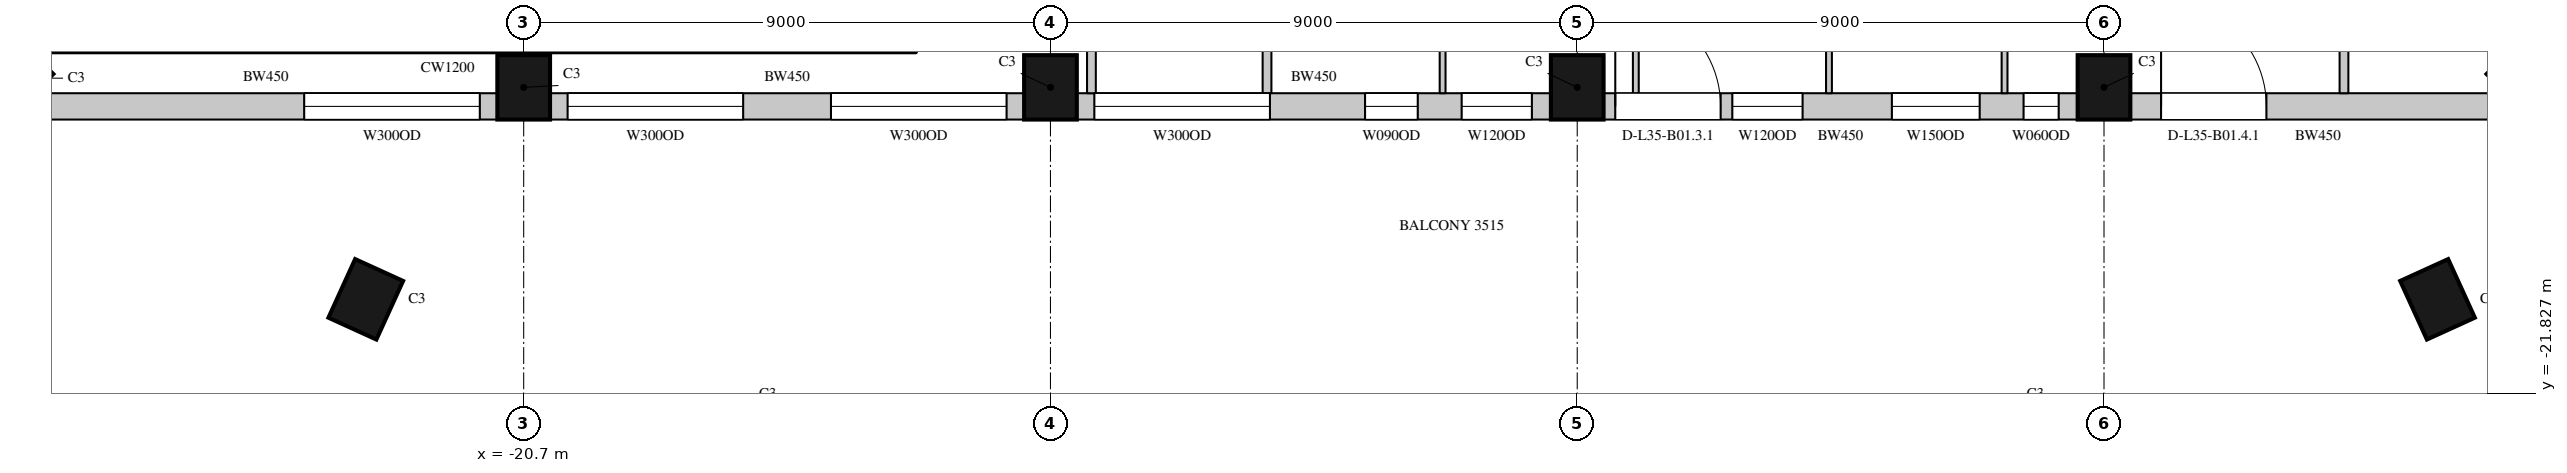
"""IFC4 building model, lengths in metres.
Left out: names, types, materials, properties, quantities, classifications, styles, units other than length and angle.
Written with IfcOpenShell. Run it as: python <this file> out.ifc"""

import sys

from ifc_helpers import new_model, si_unit, direction, frame, frame_2d, origin, origin_2d, place, context, subcontext, project, spatial, rectangle, extrude, element, fill, save


model = new_model("IFC4")
c1 = context("Model", 3, precision=1e-05, world=origin(), true_north=direction((0.0, 1.0)))
c2 = subcontext(c1, "Body", "Model", "MODEL_VIEW")
j1 = project(units=[si_unit("LENGTHUNIT", "METRE"), si_unit("PLANEANGLEUNIT", "RADIAN")], contexts=[c1])
p1 = place(None, origin())
s1 = spatial("IfcSite", under=j1, at=p1, CompositionType="ELEMENT")
p2 = place(p1, origin())
s2 = spatial("IfcBuilding", under=s1, at=p2, CompositionType="ELEMENT")
p3 = place(p2, frame((0.0, 0.0, 164.6)))
s3 = spatial("IfcBuildingStorey", under=s2, at=p3, CompositionType="ELEMENT", Elevation=164.6)
for number, where, z_axis, x_axis in (
    (1, (-29.443, -16.443, 0.0), (0.0, 0.0, 1.0), (0.707, -0.707, 0.0)),
    (2, (-20.7, -16.6, 0.0), (0.0, 0.0, 1.0), (1.0, 0.0, 0.0)),
    (3, (-11.7, -16.6, 0.0), (0.0, 0.0, 1.0), (1.0, 0.0, 0.0)),
    (4, (-2.7, -16.6, 0.0), (0.0, 0.0, 1.0), (1.0, 0.0, 0.0)),
    (5, (6.3, -16.6, 0.0), (0.0, 0.0, 1.0), (1.0, 0.0, 0.0)),
    (6, (13.543, -16.443, 0.0), (0.0, 0.0, 1.0), (0.707, 0.707, 0.0)),
    (7, (-23.398, -20.221, 0.0), (0.0, 0.0, 1.0), (0.91, -0.415, 0.0)),
    (8, (11.998, -20.221, 0.0), (0.0, 0.0, 1.0), (0.91, 0.415, 0.0)),
):
    element("IfcColumn", number, at=place(p3, frame(where, z_axis=z_axis, x_axis=x_axis)), inside=s3, PredefinedType="COLUMN", context=c2, shape_type="SweptSolid", body=[
        extrude(rectangle(XDim=0.9, YDim=1.1, at=origin_2d()), origin(), (0.0, 0.0, 1.0), 4.1),
    ])
p4 = place(p3, frame((-29.064, -16.925, 0.0), z_axis=(0.0, 0.0, 1.0), x_axis=(1.0, 0.0, 0.0)))
e9 = element("IfcWall", 9, at=p4, inside=s3, PredefinedType="SOLIDWALL", context=c2, shape_type="SweptSolid", body=[
    extrude(rectangle(XDim=7.914, YDim=0.45, at=frame_2d((3.957, 0.0))), origin(), (0.0, 0.0, 1.0), 3.8),
])
p5 = place(p4, frame((4.614, 0.0, 1.05)))
e10 = element("IfcOpeningElement", 10, at=p5, cuts=e9, PredefinedType="OPENING", context=c2, shape_type="SweptSolid", body=[
    extrude(rectangle(XDim=3.0, YDim=2.4, at=frame_2d((1.5, 1.2))), frame((0.0, 0.235, 0.0), z_axis=(0.0, -1.0, 0.0), x_axis=(1.0, 0.0, 0.0)), (0.0, 0.0, 1.0), 0.47),
])
p6 = place(p3, frame((-20.25, -16.925, 0.0), z_axis=(0.0, 0.0, 1.0), x_axis=(1.0, 0.0, 0.0)))
e11 = element("IfcWall", 11, at=p6, inside=s3, PredefinedType="SOLIDWALL", context=c2, shape_type="SweptSolid", body=[
    extrude(rectangle(XDim=8.1, YDim=0.45, at=frame_2d((4.05, 0.0))), origin(), (0.0, 0.0, 1.0), 3.8),
])
p7 = place(p6, frame((0.3, 0.0, 1.05)))
e12 = element("IfcOpeningElement", 12, at=p7, cuts=e11, PredefinedType="OPENING", context=c2, shape_type="SweptSolid", body=[
    extrude(rectangle(XDim=3.0, YDim=2.4, at=frame_2d((1.5, 1.2))), frame((0.0, 0.235, 0.0), z_axis=(0.0, -1.0, 0.0), x_axis=(1.0, 0.0, 0.0)), (0.0, 0.0, 1.0), 0.47),
])
p8 = place(p6, frame((4.8, 0.0, 1.05)))
e13 = element("IfcOpeningElement", 13, at=p8, cuts=e11, PredefinedType="OPENING", context=c2, shape_type="SweptSolid", body=[
    extrude(rectangle(XDim=3.0, YDim=2.4, at=frame_2d((1.5, 1.2))), frame((0.0, 0.235, 0.0), z_axis=(0.0, -1.0, 0.0), x_axis=(1.0, 0.0, 0.0)), (0.0, 0.0, 1.0), 0.47),
])
p9 = place(p3, frame((-11.25, -16.925, 0.0), z_axis=(0.0, 0.0, 1.0), x_axis=(1.0, 0.0, 0.0)))
e14 = element("IfcWall", 14, at=p9, inside=s3, PredefinedType="SOLIDWALL", context=c2, shape_type="SweptSolid", body=[
    extrude(rectangle(XDim=8.1, YDim=0.45, at=frame_2d((4.05, 0.0))), origin(), (0.0, 0.0, 1.0), 3.8),
])
p10 = place(p9, frame((0.3, 0.0, 1.05)))
e15 = element("IfcOpeningElement", 15, at=p10, cuts=e14, PredefinedType="OPENING", context=c2, shape_type="SweptSolid", body=[
    extrude(rectangle(XDim=3.0, YDim=2.4, at=frame_2d((1.5, 1.2))), frame((0.0, 0.235, 0.0), z_axis=(0.0, -1.0, 0.0), x_axis=(1.0, 0.0, 0.0)), (0.0, 0.0, 1.0), 0.47),
])
p11 = place(p9, frame((4.925, 0.0, 1.05)))
e16 = element("IfcOpeningElement", 16, at=p11, cuts=e14, PredefinedType="OPENING", context=c2, shape_type="SweptSolid", body=[
    extrude(rectangle(XDim=0.9, YDim=2.4, at=frame_2d((0.45, 1.2))), frame((0.0, 0.235, 0.0), z_axis=(0.0, -1.0, 0.0), x_axis=(1.0, 0.0, 0.0)), (0.0, 0.0, 1.0), 0.47),
])
p12 = place(p9, frame((6.575, 0.0, 1.05)))
e17 = element("IfcOpeningElement", 17, at=p12, cuts=e14, PredefinedType="OPENING", context=c2, shape_type="SweptSolid", body=[
    extrude(rectangle(XDim=1.2, YDim=2.4, at=frame_2d((0.6, 1.2))), frame((0.0, 0.235, 0.0), z_axis=(0.0, -1.0, 0.0), x_axis=(1.0, 0.0, 0.0)), (0.0, 0.0, 1.0), 0.47),
])
p13 = place(p3, frame((-2.25, -16.925, 0.0), z_axis=(0.0, 0.0, 1.0), x_axis=(1.0, 0.0, 0.0)))
e18 = element("IfcWall", 18, at=p13, inside=s3, PredefinedType="SOLIDWALL", context=c2, shape_type="SweptSolid", body=[
    extrude(rectangle(XDim=8.1, YDim=0.45, at=frame_2d((4.05, 0.0))), origin(), (0.0, 0.0, 1.0), 3.8),
])
p14 = place(p13, frame((0.2, 0.0, 0.0)))
e19 = element("IfcOpeningElement", 19, at=p14, cuts=e18, PredefinedType="OPENING", context=c2, shape_type="SweptSolid", body=[
    extrude(rectangle(XDim=1.8, YDim=2.4, at=frame_2d((0.9, 1.2))), frame((0.0, 0.235, 0.0), z_axis=(0.0, -1.0, 0.0), x_axis=(1.0, 0.0, 0.0)), (0.0, 0.0, 1.0), 0.47),
])
p15 = place(p13, frame((2.2, 0.0, 1.05)))
e20 = element("IfcOpeningElement", 20, at=p15, cuts=e18, PredefinedType="OPENING", context=c2, shape_type="SweptSolid", body=[
    extrude(rectangle(XDim=1.2, YDim=2.4, at=frame_2d((0.6, 1.2))), frame((0.0, 0.235, 0.0), z_axis=(0.0, -1.0, 0.0), x_axis=(1.0, 0.0, 0.0)), (0.0, 0.0, 1.0), 0.47),
])
p16 = place(p13, frame((4.926, 0.0, 1.05)))
e21 = element("IfcOpeningElement", 21, at=p16, cuts=e18, PredefinedType="OPENING", context=c2, shape_type="SweptSolid", body=[
    extrude(rectangle(XDim=1.5, YDim=2.4, at=frame_2d((0.75, 1.2))), frame((0.0, 0.235, 0.0), z_axis=(0.0, -1.0, 0.0), x_axis=(1.0, 0.0, 0.0)), (0.0, 0.0, 1.0), 0.47),
])
p17 = place(p13, frame((7.176, 0.0, 1.05)))
e22 = element("IfcOpeningElement", 22, at=p17, cuts=e18, PredefinedType="OPENING", context=c2, shape_type="SweptSolid", body=[
    extrude(rectangle(XDim=0.6, YDim=2.4, at=frame_2d((0.3, 1.2))), frame((0.0, 0.235, 0.0), z_axis=(0.0, -1.0, 0.0), x_axis=(1.0, 0.0, 0.0)), (0.0, 0.0, 1.0), 0.47),
])
p18 = place(p3, frame((6.75, -16.925, 0.0), z_axis=(0.0, 0.0, 1.0), x_axis=(1.0, 0.0, 0.0)))
e23 = element("IfcWall", 23, at=p18, inside=s3, PredefinedType="SOLIDWALL", context=c2, shape_type="SweptSolid", body=[
    extrude(rectangle(XDim=6.414, YDim=0.45, at=frame_2d((3.207, 0.0))), origin(), (0.0, 0.0, 1.0), 3.8),
])
p19 = place(p18, frame((0.525, 0.0, 0.0)))
e24 = element("IfcOpeningElement", 24, at=p19, cuts=e23, PredefinedType="OPENING", context=c2, shape_type="SweptSolid", body=[
    extrude(rectangle(XDim=1.8, YDim=2.4, at=frame_2d((0.9, 1.2))), frame((0.0, 0.235, 0.0), z_axis=(0.0, -1.0, 0.0), x_axis=(1.0, 0.0, 0.0)), (0.0, 0.0, 1.0), 0.47),
])
p20 = place(p3, frame((-26.95, -18.0, 0.0), z_axis=(0.0, 0.0, 1.0), x_axis=(1.0, 0.0, 0.0)))
e25 = element("IfcWall", 25, at=p20, inside=s3, PredefinedType="SOLIDWALL", context=c2, shape_type="SweptSolid", body=[
    extrude(rectangle(XDim=2.36, YDim=0.45, at=frame_2d((1.18, 0.0))), origin(), (0.0, 0.0, 1.0), 0.6),
])
for number, where, z_axis, x_axis in (
    (26, (-23.69, -18.0, 0.0), (0.0, 0.0, 1.0), (1.0, 0.0, 0.0)),
    (27, (-19.73, -18.0, 0.0), (0.0, 0.0, 1.0), (1.0, 0.0, 0.0)),
    (28, (-15.77, -18.0, 0.0), (0.0, 0.0, 1.0), (1.0, 0.0, 0.0)),
    (29, (-11.81, -18.0, 0.0), (0.0, 0.0, 1.0), (1.0, 0.0, 0.0)),
    (30, (-7.85, -18.0, 0.0), (0.0, 0.0, 1.0), (1.0, 0.0, 0.0)),
):
    element("IfcWall", number, at=place(p3, frame(where, z_axis=z_axis, x_axis=x_axis)), inside=s3, PredefinedType="SOLIDWALL", context=c2, shape_type="SweptSolid", body=[
        extrude(rectangle(XDim=3.76, YDim=0.45, at=frame_2d((1.88, 0.0))), origin(), (0.0, 0.0, 1.0), 0.6),
    ])
p21 = place(p3, frame((-3.89, -18.0, 0.0), z_axis=(0.0, 0.0, 1.0), x_axis=(1.0, 0.0, 0.0)))
e31 = element("IfcWall", 31, at=p21, inside=s3, PredefinedType="SOLIDWALL", context=c2, shape_type="SweptSolid", body=[
    extrude(rectangle(XDim=1.54, YDim=0.45, at=frame_2d((0.77, 0.0))), origin(), (0.0, 0.0, 1.0), 0.6),
])
p22 = place(p3, frame((0.07, -18.0, 0.0), z_axis=(0.0, 0.0, 1.0), x_axis=(1.0, 0.0, 0.0)))
e32 = element("IfcWall", 32, at=p22, inside=s3, PredefinedType="SOLIDWALL", context=c2, shape_type="SweptSolid", body=[
    extrude(rectangle(XDim=3.76, YDim=0.45, at=frame_2d((1.88, 0.0))), origin(), (0.0, 0.0, 1.0), 0.6),
])
p23 = place(p3, frame((4.03, -18.0, 0.0), z_axis=(0.0, 0.0, 1.0), x_axis=(1.0, 0.0, 0.0)))
e33 = element("IfcWall", 33, at=p23, inside=s3, PredefinedType="SOLIDWALL", context=c2, shape_type="SweptSolid", body=[
    extrude(rectangle(XDim=2.945, YDim=0.45, at=frame_2d((1.473, 0.0))), origin(), (0.0, 0.0, 1.0), 0.6),
])
p24 = place(p3, frame((-11.0, -16.7, 0.0), z_axis=(0.0, 0.0, 1.0), x_axis=(0.0, 1.0, 0.0)))
e34 = element("IfcWall", 34, at=p24, inside=s3, PredefinedType="PARTITIONING", context=c2, shape_type="SweptSolid", body=[
    extrude(rectangle(XDim=1.88, YDim=0.15, at=frame_2d((0.94, 0.0))), origin(), (0.0, 0.0, 1.0), 3.8),
])
p25 = place(p3, frame((-8.0, -16.7, 0.0), z_axis=(0.0, 0.0, 1.0), x_axis=(0.0, 1.0, 0.0)))
e35 = element("IfcWall", 35, at=p25, inside=s3, PredefinedType="PARTITIONING", context=c2, shape_type="SweptSolid", body=[
    extrude(rectangle(XDim=5.2, YDim=0.15, at=frame_2d((2.6, 0.0))), origin(), (0.0, 0.0, 1.0), 3.8),
])
p26 = place(p3, frame((10.4, -16.7, 0.0), z_axis=(0.0, 0.0, 1.0), x_axis=(0.0, 1.0, 0.0)))
e36 = element("IfcWall", 36, at=p26, inside=s3, PredefinedType="PARTITIONING", context=c2, shape_type="SweptSolid", body=[
    extrude(rectangle(XDim=5.3, YDim=0.15, at=frame_2d((2.65, 0.0))), origin(), (0.0, 0.0, 1.0), 3.8),
])
for number, where, z_axis, x_axis in (
    (37, (-5.0, -16.7, 0.0), (0.0, 0.0, 1.0), (0.0, 1.0, 0.0)),
    (38, (-1.699, -16.7, 0.0), (0.0, 0.0, 1.0), (0.0, 1.0, 0.0)),
):
    element("IfcWall", number, at=place(p3, frame(where, z_axis=z_axis, x_axis=x_axis)), inside=s3, PredefinedType="PARTITIONING", context=c2, shape_type="SweptSolid", body=[
        extrude(rectangle(XDim=5.2, YDim=0.1, at=frame_2d((2.6, 0.0))), origin(), (0.0, 0.0, 1.0), 3.8),
    ])
p27 = place(p3, frame((1.601, -16.7, 0.0), z_axis=(0.0, 0.0, 1.0), x_axis=(0.0, 1.0, 0.0)))
e39 = element("IfcWall", 39, at=p27, inside=s3, PredefinedType="PARTITIONING", context=c2, shape_type="SweptSolid", body=[
    extrude(rectangle(XDim=5.2, YDim=0.1, at=frame_2d((2.6, 0.0))), origin(), (0.0, 0.0, 1.0), 3.15),
])
p28 = place(p3, frame((4.601, -16.7, 0.0), z_axis=(0.0, 0.0, 1.0), x_axis=(0.0, 1.0, 0.0)))
e40 = element("IfcWall", 40, at=p28, inside=s3, PredefinedType="PARTITIONING", context=c2, shape_type="SweptSolid", body=[
    extrude(rectangle(XDim=5.2, YDim=0.1, at=frame_2d((2.6, 0.0))), origin(), (0.0, 0.0, 1.0), 3.8),
])
p29 = place(p5, origin())
e41 = element("IfcWindow", 41, at=p29, inside=s3, PartitioningType="SINGLE_PANEL", PredefinedType="WINDOW", context=c2, shape_type="SweptSolid", body=[
    extrude(rectangle(XDim=3.0, YDim=2.4, at=frame_2d((1.5, 1.2))), frame((0.0, 0.135, 0.0), z_axis=(0.0, -1.0, 0.0), x_axis=(1.0, 0.0, 0.0)), (0.0, 0.0, 1.0), 0.06),
])
fill(e10, e41)
p30 = place(p7, origin())
e42 = element("IfcWindow", 42, at=p30, inside=s3, PartitioningType="SINGLE_PANEL", PredefinedType="WINDOW", context=c2, shape_type="SweptSolid", body=[
    extrude(rectangle(XDim=3.0, YDim=2.4, at=frame_2d((1.5, 1.2))), frame((0.0, 0.135, 0.0), z_axis=(0.0, -1.0, 0.0), x_axis=(1.0, 0.0, 0.0)), (0.0, 0.0, 1.0), 0.06),
])
fill(e12, e42)
p31 = place(p8, origin())
e43 = element("IfcWindow", 43, at=p31, inside=s3, PartitioningType="SINGLE_PANEL", PredefinedType="WINDOW", context=c2, shape_type="SweptSolid", body=[
    extrude(rectangle(XDim=3.0, YDim=2.4, at=frame_2d((1.5, 1.2))), frame((0.0, 0.135, 0.0), z_axis=(0.0, -1.0, 0.0), x_axis=(1.0, 0.0, 0.0)), (0.0, 0.0, 1.0), 0.06),
])
fill(e13, e43)
p32 = place(p10, origin())
e44 = element("IfcWindow", 44, at=p32, inside=s3, PartitioningType="SINGLE_PANEL", PredefinedType="WINDOW", context=c2, shape_type="SweptSolid", body=[
    extrude(rectangle(XDim=3.0, YDim=2.4, at=frame_2d((1.5, 1.2))), frame((0.0, 0.135, 0.0), z_axis=(0.0, -1.0, 0.0), x_axis=(1.0, 0.0, 0.0)), (0.0, 0.0, 1.0), 0.06),
])
fill(e15, e44)
p33 = place(p14, origin())
e45 = element("IfcDoor", 45, at=p33, inside=s3, OperationType="SLIDING_TO_LEFT", PredefinedType="DOOR", context=c2, shape_type="SweptSolid", body=[
    extrude(rectangle(XDim=1.8, YDim=2.4, at=frame_2d((0.9, 1.2))), frame((0.0, 0.13, 0.0), z_axis=(0.0, -1.0, 0.0), x_axis=(1.0, 0.0, 0.0)), (0.0, 0.0, 1.0), 0.05),
])
fill(e19, e45)
p34 = place(p15, origin())
e46 = element("IfcWindow", 46, at=p34, inside=s3, PartitioningType="SINGLE_PANEL", PredefinedType="WINDOW", context=c2, shape_type="SweptSolid", body=[
    extrude(rectangle(XDim=1.2, YDim=2.4, at=frame_2d((0.6, 1.2))), frame((0.0, 0.135, 0.0), z_axis=(0.0, -1.0, 0.0), x_axis=(1.0, 0.0, 0.0)), (0.0, 0.0, 1.0), 0.06),
])
fill(e20, e46)
p35 = place(p19, origin())
e47 = element("IfcDoor", 47, at=p35, inside=s3, OperationType="SLIDING_TO_LEFT", PredefinedType="DOOR", context=c2, shape_type="SweptSolid", body=[
    extrude(rectangle(XDim=1.8, YDim=2.4, at=frame_2d((0.9, 1.2))), frame((0.0, 0.13, 0.0), z_axis=(0.0, -1.0, 0.0), x_axis=(1.0, 0.0, 0.0)), (0.0, 0.0, 1.0), 0.05),
])
fill(e24, e47)
p36 = place(p11, origin())
e48 = element("IfcWindow", 48, at=p36, inside=s3, PartitioningType="SINGLE_PANEL", PredefinedType="WINDOW", context=c2, shape_type="SweptSolid", body=[
    extrude(rectangle(XDim=0.9, YDim=2.4, at=frame_2d((0.45, 1.2))), frame((0.0, 0.135, 0.0), z_axis=(0.0, -1.0, 0.0), x_axis=(1.0, 0.0, 0.0)), (0.0, 0.0, 1.0), 0.06),
])
fill(e16, e48)
p37 = place(p12, origin())
e49 = element("IfcWindow", 49, at=p37, inside=s3, PartitioningType="SINGLE_PANEL", PredefinedType="WINDOW", context=c2, shape_type="SweptSolid", body=[
    extrude(rectangle(XDim=1.2, YDim=2.4, at=frame_2d((0.6, 1.2))), frame((0.0, 0.135, 0.0), z_axis=(0.0, -1.0, 0.0), x_axis=(1.0, 0.0, 0.0)), (0.0, 0.0, 1.0), 0.06),
])
fill(e17, e49)
p38 = place(p16, origin())
e50 = element("IfcWindow", 50, at=p38, inside=s3, PartitioningType="SINGLE_PANEL", PredefinedType="WINDOW", context=c2, shape_type="SweptSolid", body=[
    extrude(rectangle(XDim=1.5, YDim=2.4, at=frame_2d((0.75, 1.2))), frame((0.0, 0.135, 0.0), z_axis=(0.0, -1.0, 0.0), x_axis=(1.0, 0.0, 0.0)), (0.0, 0.0, 1.0), 0.06),
])
fill(e21, e50)
p39 = place(p17, origin())
e51 = element("IfcWindow", 51, at=p39, inside=s3, PartitioningType="SINGLE_PANEL", PredefinedType="WINDOW", context=c2, shape_type="SweptSolid", body=[
    extrude(rectangle(XDim=0.6, YDim=2.4, at=frame_2d((0.3, 1.2))), frame((0.0, 0.135, 0.0), z_axis=(0.0, -1.0, 0.0), x_axis=(1.0, 0.0, 0.0)), (0.0, 0.0, 1.0), 0.06),
])
fill(e22, e51)
save(model, sys.argv[1])
